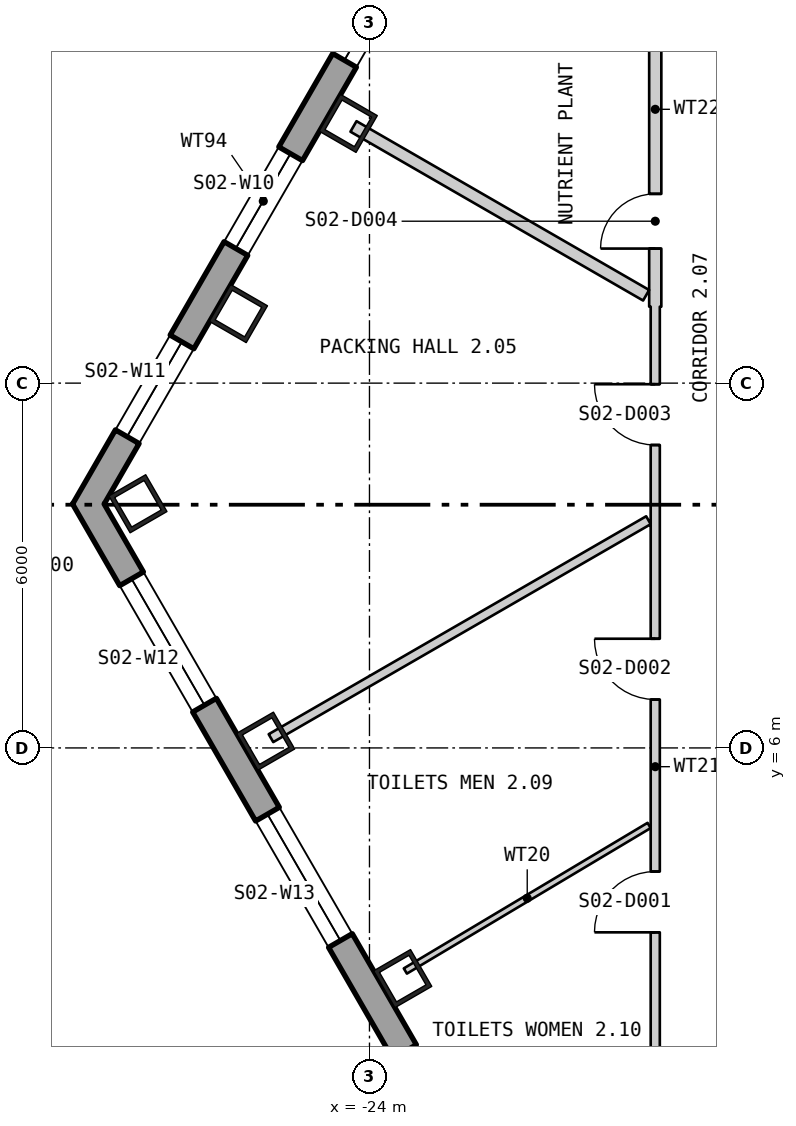
"""IFC4 building model, lengths in metres.
Left out: names, types, materials, properties, quantities, classifications, styles, units other than length and angle.
Written with IfcOpenShell. Run it as: python <this file> out.ifc"""

import sys

from ifc_helpers import new_model, si_unit, direction, frame, frame_2d, origin, origin_2d, place, context, subcontext, project, spatial, polyline, rectangle, hollow_rectangle, outline, extrude, element, fill, save


model = new_model("IFC4")
c1 = context("Model", 3, precision=1e-05, world=origin(), true_north=direction((0.0, 1.0)))
c2 = subcontext(c1, "Body", "Model", "MODEL_VIEW")
j1 = project(units=[si_unit("LENGTHUNIT", "METRE"), si_unit("PLANEANGLEUNIT", "RADIAN")], contexts=[c1])
p1 = place(None, origin())
s1 = spatial("IfcSite", under=j1, at=p1, CompositionType="ELEMENT")
p2 = place(p1, origin())
s2 = spatial("IfcBuilding", under=s1, at=p2, CompositionType="ELEMENT")
p3 = place(p2, frame((0.0, 0.0, 33.3)))
s3 = spatial("IfcBuildingStorey", under=s2, at=p3, CompositionType="ELEMENT", Elevation=33.3)
for number, where, z_axis, x_axis in (
    (1, (-24.349, 16.272, 0.0), (0.0, 0.0, 1.0), (-0.5, -0.866, 0.0)),
    (2, (-26.155, 13.144, 0.0), (0.0, 0.0, 1.0), (-0.5, -0.866, 0.0)),
    (3, (-27.808, 10.016, 0.0), (0.0, 0.0, 1.0), (0.5, -0.866, 0.0)),
    (4, (-25.707, 6.111, 0.0), (0.0, 0.0, 1.0), (0.5, -0.866, 0.0)),
    (5, (-23.453, 2.206, 0.0), (0.0, 0.0, 1.0), (0.5, -0.866, 0.0)),
):
    element("IfcColumn", number, at=place(p3, frame(where, z_axis=z_axis, x_axis=x_axis)), inside=s3, PredefinedType="COLUMN", context=c2, shape_type="SweptSolid", body=[
        extrude(hollow_rectangle(XDim=0.7, YDim=0.7, WallThickness=0.07, at=origin_2d()), origin(), (0.0, 0.0, 1.0), 4.5),
    ])
p4 = place(p3, frame((-22.871, 19.973, -0.4), z_axis=(0.0, 0.0, 1.0), x_axis=(-0.500002460556, -0.866023983177, 0.0)))
e6 = element("IfcWall", 6, at=p4, inside=s3, PredefinedType="SOLIDWALL", context=c2, shape_type="SweptSolid", body=[
    extrude(outline(polyline([(-0.13, -0.225), (11.63, -0.225), (11.37, 0.225), (0.13, 0.225), (-0.13, -0.225)])), origin(), (0.0, 0.0, 1.0), 4.5),
])
p5 = place(p4, frame((1.276, 0.0, 1.3)))
e7 = element("IfcOpeningElement", 7, at=p5, cuts=e6, PredefinedType="OPENING", context=c2, shape_type="SweptSolid", body=[
    extrude(rectangle(XDim=1.8, YDim=2.6, at=frame_2d((0.9, 1.3))), frame((0.0, 0.235, 0.0), z_axis=(0.0, -1.0, 0.0), x_axis=(1.0, 0.0, 0.0)), (0.0, 0.0, 1.0), 0.47),
])
p6 = place(p4, frame((4.85, 0.0, 1.3)))
e8 = element("IfcOpeningElement", 8, at=p6, cuts=e6, PredefinedType="OPENING", context=c2, shape_type="SweptSolid", body=[
    extrude(rectangle(XDim=1.8, YDim=2.6, at=frame_2d((0.9, 1.3))), frame((0.0, 0.235, 0.0), z_axis=(0.0, -1.0, 0.0), x_axis=(1.0, 0.0, 0.0)), (0.0, 0.0, 1.0), 0.47),
])
p7 = place(p4, frame((8.424, 0.0, 1.3)))
e9 = element("IfcOpeningElement", 9, at=p7, cuts=e6, PredefinedType="OPENING", context=c2, shape_type="SweptSolid", body=[
    extrude(rectangle(XDim=1.8, YDim=2.6, at=frame_2d((0.9, 1.3))), frame((0.0, 0.235, 0.0), z_axis=(0.0, -1.0, 0.0), x_axis=(1.0, 0.0, 0.0)), (0.0, 0.0, 1.0), 0.47),
])
p8 = place(p3, frame((-28.625, 10.015, -0.18), z_axis=(0.0, 0.0, 1.0), x_axis=(0.500000335318, -0.866025210188, 0.0)))
e10 = element("IfcWall", 10, at=p8, inside=s3, PredefinedType="SOLIDWALL", context=c2, shape_type="SweptSolid", body=[
    extrude(outline(polyline([(-0.13, -0.225), (45.88, -0.225), (45.62, 0.225), (0.13, 0.225), (-0.13, -0.225)])), origin(), (0.0, 0.0, 1.0), 4.28),
])
p9 = place(p8, frame((1.425, 0.0, 1.08)))
e11 = element("IfcOpeningElement", 11, at=p9, cuts=e10, PredefinedType="OPENING", context=c2, shape_type="SweptSolid", body=[
    extrude(rectangle(XDim=2.4, YDim=2.6, at=frame_2d((1.2, 1.3))), frame((0.0, 0.235, 0.0), z_axis=(0.0, -1.0, 0.0), x_axis=(1.0, 0.0, 0.0)), (0.0, 0.0, 1.0), 0.47),
])
p10 = place(p8, frame((5.895, 0.0, 1.08)))
e12 = element("IfcOpeningElement", 12, at=p10, cuts=e10, PredefinedType="OPENING", context=c2, shape_type="SweptSolid", body=[
    extrude(rectangle(XDim=2.4, YDim=2.6, at=frame_2d((1.2, 1.3))), frame((0.0, 0.235, 0.0), z_axis=(0.0, -1.0, 0.0), x_axis=(1.0, 0.0, 0.0)), (0.0, 0.0, 1.0), 0.47),
])
p11 = place(p8, frame((10.403, 0.0, 1.08)))
e13 = element("IfcOpeningElement", 13, at=p11, cuts=e10, PredefinedType="OPENING", context=c2, shape_type="SweptSolid", body=[
    extrude(rectangle(XDim=2.4, YDim=2.6, at=frame_2d((1.2, 1.3))), frame((0.0, 0.235, 0.0), z_axis=(0.0, -1.0, 0.0), x_axis=(1.0, 0.0, 0.0)), (0.0, 0.0, 1.0), 0.47),
])
p12 = place(p8, frame((14.912, 0.0, 1.08)))
e14 = element("IfcOpeningElement", 14, at=p12, cuts=e10, PredefinedType="OPENING", context=c2, shape_type="SweptSolid", body=[
    extrude(rectangle(XDim=2.4, YDim=2.6, at=frame_2d((1.2, 1.3))), frame((0.0, 0.235, 0.0), z_axis=(0.0, -1.0, 0.0), x_axis=(1.0, 0.0, 0.0)), (0.0, 0.0, 1.0), 0.47),
])
p13 = place(p8, frame((19.421, 0.0, 1.08)))
e15 = element("IfcOpeningElement", 15, at=p13, cuts=e10, PredefinedType="OPENING", context=c2, shape_type="SweptSolid", body=[
    extrude(rectangle(XDim=2.4, YDim=2.6, at=frame_2d((1.2, 1.3))), frame((0.0, 0.235, 0.0), z_axis=(0.0, -1.0, 0.0), x_axis=(1.0, 0.0, 0.0)), (0.0, 0.0, 1.0), 0.47),
])
p14 = place(p8, frame((23.929, 0.0, 1.08)))
e16 = element("IfcOpeningElement", 16, at=p14, cuts=e10, PredefinedType="OPENING", context=c2, shape_type="SweptSolid", body=[
    extrude(rectangle(XDim=2.4, YDim=2.6, at=frame_2d((1.2, 1.3))), frame((0.0, 0.235, 0.0), z_axis=(0.0, -1.0, 0.0), x_axis=(1.0, 0.0, 0.0)), (0.0, 0.0, 1.0), 0.47),
])
p15 = place(p8, frame((28.438, 0.0, 1.08)))
e17 = element("IfcOpeningElement", 17, at=p15, cuts=e10, PredefinedType="OPENING", context=c2, shape_type="SweptSolid", body=[
    extrude(rectangle(XDim=2.4, YDim=2.6, at=frame_2d((1.2, 1.3))), frame((0.0, 0.235, 0.0), z_axis=(0.0, -1.0, 0.0), x_axis=(1.0, 0.0, 0.0)), (0.0, 0.0, 1.0), 0.47),
])
p16 = place(p8, frame((32.947, 0.0, 1.08)))
e18 = element("IfcOpeningElement", 18, at=p16, cuts=e10, PredefinedType="OPENING", context=c2, shape_type="SweptSolid", body=[
    extrude(rectangle(XDim=2.4, YDim=2.6, at=frame_2d((1.2, 1.3))), frame((0.0, 0.235, 0.0), z_axis=(0.0, -1.0, 0.0), x_axis=(1.0, 0.0, 0.0)), (0.0, 0.0, 1.0), 0.47),
])
p17 = place(p8, frame((37.455, 0.0, 1.08)))
e19 = element("IfcOpeningElement", 19, at=p17, cuts=e10, PredefinedType="OPENING", context=c2, shape_type="SweptSolid", body=[
    extrude(rectangle(XDim=2.4, YDim=2.6, at=frame_2d((1.2, 1.3))), frame((0.0, 0.235, 0.0), z_axis=(0.0, -1.0, 0.0), x_axis=(1.0, 0.0, 0.0)), (0.0, 0.0, 1.0), 0.47),
])
p18 = place(p8, frame((41.925, 0.0, 1.08)))
e20 = element("IfcOpeningElement", 20, at=p18, cuts=e10, PredefinedType="OPENING", context=c2, shape_type="SweptSolid", body=[
    extrude(rectangle(XDim=2.4, YDim=2.6, at=frame_2d((1.2, 1.3))), frame((0.0, 0.235, 0.0), z_axis=(0.0, -1.0, 0.0), x_axis=(1.0, 0.0, 0.0)), (0.0, 0.0, 1.0), 0.47),
])
p19 = place(p3, frame((-25.62, 6.161, 0.0), z_axis=(0.0, 0.0, 1.0), x_axis=(0.866036909293, 0.499980071345, 0.0)))
e21 = element("IfcWall", 21, at=p19, inside=s3, PredefinedType="PARTITIONING", context=c2, shape_type="SweptSolid", body=[
    extrude(rectangle(XDim=7.168, YDim=0.15, at=frame_2d((3.584, 0.0))), origin(), (0.0, 0.0, 1.0), 4.3),
])
p20 = place(p3, frame((-24.263, 16.222, 0.0), z_axis=(0.0, 0.0, 1.0), x_axis=(0.86616461284, -0.499758805289, 0.0)))
e22 = element("IfcWall", 22, at=p20, inside=s3, PredefinedType="PARTITIONING", context=c2, shape_type="SweptSolid", body=[
    extrude(rectangle(XDim=5.557, YDim=0.2, at=frame_2d((2.778, 0.0))), origin(), (0.0, 0.0, 1.0), 4.3),
])
p21 = place(p3, frame((-23.41, 2.331, 0.0), z_axis=(0.0, 0.0, 1.0), x_axis=(0.858568146325, 0.512699461786, 0.0)))
e23 = element("IfcWall", 23, at=p21, inside=s3, PredefinedType="PARTITIONING", context=c2, shape_type="SweptSolid", body=[
    extrude(rectangle(XDim=4.669, YDim=0.1, at=frame_2d((2.335, 0.0))), origin(), (0.0, 0.0, 1.0), 4.3),
])
p22 = place(p3, frame((-19.3, -1.875, 0.0), z_axis=(0.0, 0.0, 1.0), x_axis=(0.0, 1.0, 0.0)))
e24 = element("IfcWall", 24, at=p22, inside=s3, PredefinedType="PARTITIONING", context=c2, shape_type="SweptSolid", body=[
    extrude(rectangle(XDim=15.133, YDim=0.15, at=frame_2d((7.566, 0.0))), origin(), (0.0, 0.0, 1.0), 4.3),
])
p23 = place(p22, frame((4.842, 0.0, 0.0)))
e25 = element("IfcOpeningElement", 25, at=p23, cuts=e24, PredefinedType="OPENING", context=c2, shape_type="SweptSolid", body=[
    extrude(rectangle(XDim=1.0, YDim=2.1, at=frame_2d((0.5, 1.05))), frame((0.0, 0.085, 0.0), z_axis=(0.0, -1.0, 0.0), x_axis=(1.0, 0.0, 0.0)), (0.0, 0.0, 1.0), 0.17),
])
p24 = place(p22, frame((8.671, 0.0, 0.0)))
e26 = element("IfcOpeningElement", 26, at=p24, cuts=e24, PredefinedType="OPENING", context=c2, shape_type="SweptSolid", body=[
    extrude(rectangle(XDim=1.0, YDim=2.1, at=frame_2d((0.5, 1.05))), frame((0.0, 0.085, 0.0), z_axis=(0.0, -1.0, 0.0), x_axis=(1.0, 0.0, 0.0)), (0.0, 0.0, 1.0), 0.17),
])
p25 = place(p22, frame((12.857, 0.0, 0.0)))
e27 = element("IfcOpeningElement", 27, at=p25, cuts=e24, PredefinedType="OPENING", context=c2, shape_type="SweptSolid", body=[
    extrude(rectangle(XDim=1.0, YDim=2.1, at=frame_2d((0.5, 1.05))), frame((0.0, 0.085, 0.0), z_axis=(0.0, -1.0, 0.0), x_axis=(1.0, 0.0, 0.0)), (0.0, 0.0, 1.0), 0.17),
])
p26 = place(p3, frame((-19.3, 13.258, 0.0), z_axis=(0.0, 0.0, 1.0), x_axis=(0.0, 1.0, 0.0)))
e28 = element("IfcWall", 28, at=p26, inside=s3, PredefinedType="PARTITIONING", context=c2, shape_type="SweptSolid", body=[
    extrude(rectangle(XDim=6.491, YDim=0.2, at=frame_2d((3.245, 0.0))), origin(), (0.0, 0.0, 1.0), 4.3),
])
p27 = place(p26, frame((0.955, 0.0, 0.0)))
e29 = element("IfcOpeningElement", 29, at=p27, cuts=e28, PredefinedType="OPENING", context=c2, shape_type="SweptSolid", body=[
    extrude(rectangle(XDim=0.9, YDim=2.1, at=frame_2d((0.45, 1.05))), frame((0.0, 0.11, 0.0), z_axis=(0.0, -1.0, 0.0), x_axis=(1.0, 0.0, 0.0)), (0.0, 0.0, 1.0), 0.22),
])
p28 = place(p5, origin())
e30 = element("IfcWindow", 30, at=p28, inside=s3, PartitioningType="SINGLE_PANEL", PredefinedType="WINDOW", context=c2, shape_type="SweptSolid", body=[
    extrude(rectangle(XDim=1.8, YDim=2.6, at=frame_2d((0.9, 1.3))), frame((0.0, 0.105, 0.0), z_axis=(0.0, -1.0, 0.0), x_axis=(1.0, 0.0, 0.0)), (0.0, 0.0, 1.0), 0.06),
])
fill(e7, e30)
p29 = place(p6, origin())
e31 = element("IfcWindow", 31, at=p29, inside=s3, PartitioningType="SINGLE_PANEL", PredefinedType="WINDOW", context=c2, shape_type="SweptSolid", body=[
    extrude(rectangle(XDim=1.8, YDim=2.6, at=frame_2d((0.9, 1.3))), frame((0.0, 0.105, 0.0), z_axis=(0.0, -1.0, 0.0), x_axis=(1.0, 0.0, 0.0)), (0.0, 0.0, 1.0), 0.06),
])
fill(e8, e31)
p30 = place(p7, origin())
e32 = element("IfcWindow", 32, at=p30, inside=s3, PartitioningType="SINGLE_PANEL", PredefinedType="WINDOW", context=c2, shape_type="SweptSolid", body=[
    extrude(rectangle(XDim=1.8, YDim=2.6, at=frame_2d((0.9, 1.3))), frame((0.0, 0.105, 0.0), z_axis=(0.0, -1.0, 0.0), x_axis=(1.0, 0.0, 0.0)), (0.0, 0.0, 1.0), 0.06),
])
fill(e9, e32)
p31 = place(p9, origin())
e33 = element("IfcWindow", 33, at=p31, inside=s3, PartitioningType="SINGLE_PANEL", PredefinedType="WINDOW", context=c2, shape_type="SweptSolid", body=[
    extrude(rectangle(XDim=2.4, YDim=2.6, at=frame_2d((1.2, 1.3))), frame((0.0, 0.105, 0.0), z_axis=(0.0, -1.0, 0.0), x_axis=(1.0, 0.0, 0.0)), (0.0, 0.0, 1.0), 0.06),
])
fill(e11, e33)
p32 = place(p10, origin())
e34 = element("IfcWindow", 34, at=p32, inside=s3, PartitioningType="SINGLE_PANEL", PredefinedType="WINDOW", context=c2, shape_type="SweptSolid", body=[
    extrude(rectangle(XDim=2.4, YDim=2.6, at=frame_2d((1.2, 1.3))), frame((0.0, 0.105, 0.0), z_axis=(0.0, -1.0, 0.0), x_axis=(1.0, 0.0, 0.0)), (0.0, 0.0, 1.0), 0.06),
])
fill(e12, e34)
p33 = place(p23, origin())
e35 = element("IfcDoor", 35, at=p33, inside=s3, OperationType="SINGLE_SWING_RIGHT", PredefinedType="DOOR", context=c2, shape_type="SweptSolid", body=[
    extrude(rectangle(XDim=1.0, YDim=2.1, at=frame_2d((0.5, 1.05))), frame((0.0, 0.025, 0.0), z_axis=(0.0, -1.0, 0.0), x_axis=(1.0, 0.0, 0.0)), (0.0, 0.0, 1.0), 0.05),
])
fill(e25, e35)
p34 = place(p24, origin())
e36 = element("IfcDoor", 36, at=p34, inside=s3, OperationType="SINGLE_SWING_LEFT", PredefinedType="DOOR", context=c2, shape_type="SweptSolid", body=[
    extrude(rectangle(XDim=1.0, YDim=2.1, at=frame_2d((0.5, 1.05))), frame((0.0, 0.025, 0.0), z_axis=(0.0, -1.0, 0.0), x_axis=(1.0, 0.0, 0.0)), (0.0, 0.0, 1.0), 0.05),
])
fill(e26, e36)
p35 = place(p25, origin())
e37 = element("IfcDoor", 37, at=p35, inside=s3, OperationType="SINGLE_SWING_LEFT", PredefinedType="DOOR", context=c2, shape_type="SweptSolid", body=[
    extrude(rectangle(XDim=1.0, YDim=2.1, at=frame_2d((0.5, 1.05))), frame((0.0, 0.025, 0.0), z_axis=(0.0, -1.0, 0.0), x_axis=(1.0, 0.0, 0.0)), (0.0, 0.0, 1.0), 0.05),
])
fill(e27, e37)
p36 = place(p27, origin())
e38 = element("IfcDoor", 38, at=p36, inside=s3, OperationType="SINGLE_SWING_RIGHT", PredefinedType="DOOR", context=c2, shape_type="SweptSolid", body=[
    extrude(rectangle(XDim=0.9, YDim=2.1, at=frame_2d((0.45, 1.05))), frame((0.0, 0.025, 0.0), z_axis=(0.0, -1.0, 0.0), x_axis=(1.0, 0.0, 0.0)), (0.0, 0.0, 1.0), 0.05),
])
fill(e29, e38)
save(model, sys.argv[1])
